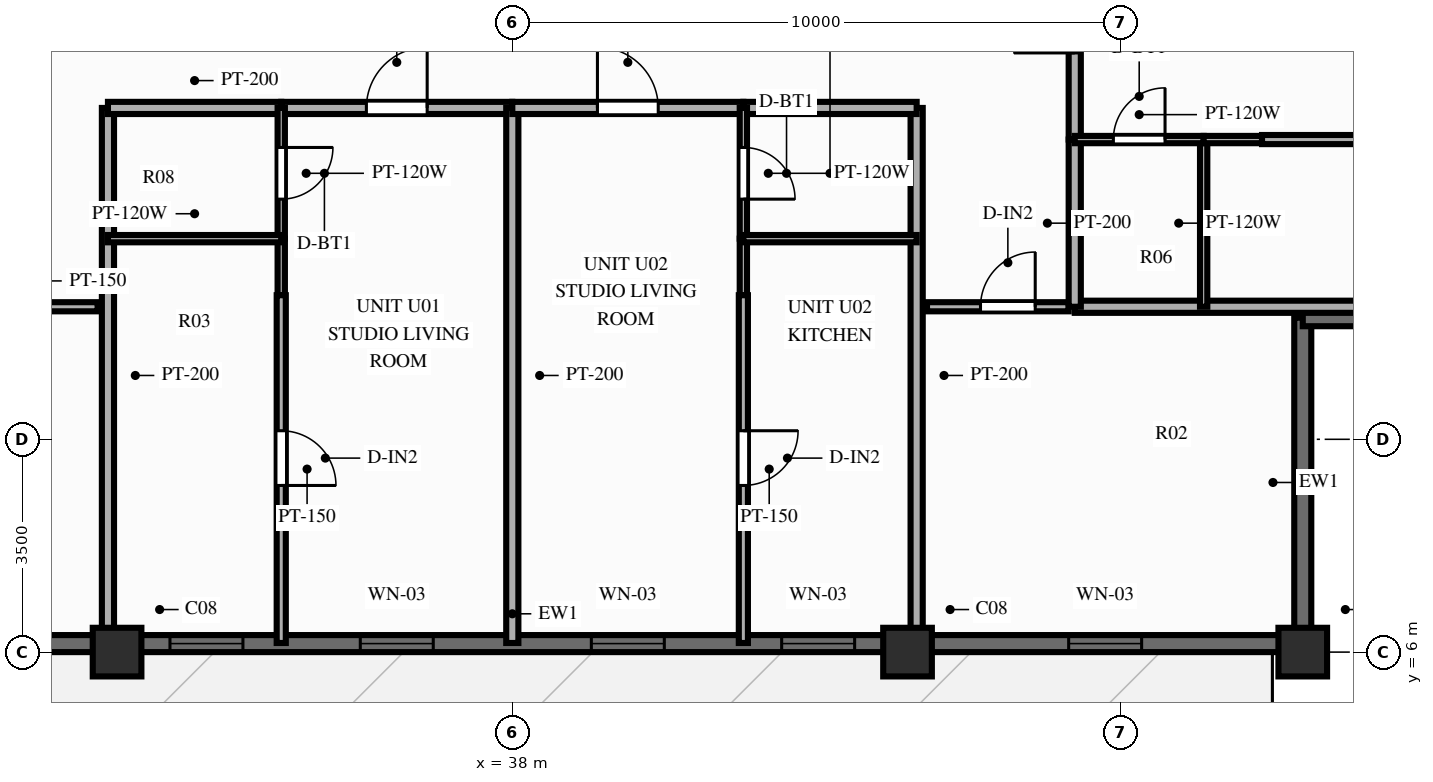
"""IFC4 building model, lengths in metres.
Left out: names, types, materials, properties, quantities, classifications, styles, units other than length and angle.
Written with IfcOpenShell. Run it as: python <this file> out.ifc"""

import sys

from ifc_helpers import new_model, si_unit, direction, frame, frame_2d, origin, origin_2d, place, context, subcontext, project, spatial, rectangle, extrude, source, transform, mapped, element, fill, save


model = new_model("IFC4")
c1 = context("Model", 3, precision=1e-05, world=origin(), true_north=direction((0.0, 1.0)))
c2 = subcontext(c1, "Body", "Model", "MODEL_VIEW")
j1 = project(units=[si_unit("LENGTHUNIT", "METRE"), si_unit("PLANEANGLEUNIT", "RADIAN")], contexts=[c1])
p1 = place(None, origin())
s1 = spatial("IfcSite", under=j1, at=p1, CompositionType="ELEMENT")
p2 = place(p1, origin())
s2 = spatial("IfcBuilding", under=s1, at=p2, CompositionType="ELEMENT")
p3 = place(p2, frame((0.0, 0.0, 199.6)))
s3 = spatial("IfcBuildingStorey", under=s2, at=p3, CompositionType="ELEMENT", Elevation=199.6)
m1 = source(origin(), c2, "Body", "SweptSolid", [
    extrude(rectangle(XDim=0.8, YDim=0.8, at=origin_2d()), origin(), (0.0, 0.0, 1.0), 3.0),
])
for number, where, z_axis, x_axis in (
    (1, (31.5, 6.0, 0.0), (0.0, 0.0, 1.0), (1.0, 0.0, 0.0)),
    (2, (44.5, 6.0, 0.0), (0.0, 0.0, 1.0), (1.0, 0.0, 0.0)),
    (3, (51.0, 6.0, 0.0), (0.0, 0.0, 1.0), (1.0, 0.0, 0.0)),
):
    element("IfcColumn", number, at=place(p3, frame(where, z_axis=z_axis, x_axis=x_axis)), inside=s3, PredefinedType="COLUMN", context=c2, shape_type="MappedRepresentation", body=[
        mapped(m1, transform((0.0, 0.0, 0.0), scale=1.0)),
    ])
p4 = place(p3, frame((25.0, 6.14, 0.0), z_axis=(0.0, 0.0, 1.0), x_axis=(1.0, 0.0, 0.0)))
e4 = element("IfcWall", 4, at=p4, inside=s3, PredefinedType="SOLIDWALL", context=c2, shape_type="SweptSolid", body=[
    extrude(rectangle(XDim=26.0, YDim=0.28, at=frame_2d((13.0, 0.0))), origin(), (0.0, 0.0, 1.0), 2.28),
])
p5 = place(p4, frame((3.8, 0.0, 0.0), z_axis=(0.0, 0.0, 1.0), x_axis=(-1.0, 0.0, 0.0)))
e5 = element("IfcOpeningElement", 5, at=p5, cuts=e4, PredefinedType="OPENING", context=c2, shape_type="SweptSolid", body=[
    extrude(rectangle(XDim=1.1, YDim=2.15, at=frame_2d((0.55, 1.075))), frame((0.0, 0.152, 0.0), z_axis=(0.0, -1.0, 0.0), x_axis=(1.0, 0.0, 0.0)), (0.0, 0.0, 1.0), 0.304),
])
p6 = place(p4, frame((7.37, 0.0, 0.25)))
e6 = element("IfcOpeningElement", 6, at=p6, cuts=e4, PredefinedType="OPENING", context=c2, shape_type="SweptSolid", body=[
    extrude(rectangle(XDim=1.2, YDim=1.5, at=frame_2d((0.6, 0.75))), frame((0.0, 0.152, 0.0), z_axis=(0.0, -1.0, 0.0), x_axis=(1.0, 0.0, 0.0)), (0.0, 0.0, 1.0), 0.304),
])
p7 = place(p4, frame((10.5, 0.0, 0.25)))
e7 = element("IfcOpeningElement", 7, at=p7, cuts=e4, PredefinedType="OPENING", context=c2, shape_type="SweptSolid", body=[
    extrude(rectangle(XDim=1.2, YDim=1.5, at=frame_2d((0.6, 0.75))), frame((0.0, 0.152, 0.0), z_axis=(0.0, -1.0, 0.0), x_axis=(1.0, 0.0, 0.0)), (0.0, 0.0, 1.0), 0.304),
])
p8 = place(p4, frame((14.3, 0.0, 0.25)))
e8 = element("IfcOpeningElement", 8, at=p8, cuts=e4, PredefinedType="OPENING", context=c2, shape_type="SweptSolid", body=[
    extrude(rectangle(XDim=1.2, YDim=1.5, at=frame_2d((0.6, 0.75))), frame((0.0, 0.152, 0.0), z_axis=(0.0, -1.0, 0.0), x_axis=(1.0, 0.0, 0.0)), (0.0, 0.0, 1.0), 0.304),
])
p9 = place(p4, frame((17.43, 0.0, 0.25)))
e9 = element("IfcOpeningElement", 9, at=p9, cuts=e4, PredefinedType="OPENING", context=c2, shape_type="SweptSolid", body=[
    extrude(rectangle(XDim=1.2, YDim=1.5, at=frame_2d((0.6, 0.75))), frame((0.0, 0.152, 0.0), z_axis=(0.0, -1.0, 0.0), x_axis=(1.0, 0.0, 0.0)), (0.0, 0.0, 1.0), 0.304),
])
p10 = place(p4, frame((22.15, 0.0, 0.25)))
e10 = element("IfcOpeningElement", 10, at=p10, cuts=e4, PredefinedType="OPENING", context=c2, shape_type="SweptSolid", body=[
    extrude(rectangle(XDim=1.2, YDim=1.5, at=frame_2d((0.6, 0.75))), frame((0.0, 0.152, 0.0), z_axis=(0.0, -1.0, 0.0), x_axis=(1.0, 0.0, 0.0)), (0.0, 0.0, 1.0), 0.304),
])
for number, where, z_axis, x_axis in (
    (11, (51.0, 6.08, 0.0), (0.0, 0.0, 1.0), (0.0, 1.0, 0.0)),
    (12, (51.0, 11.5, 0.0), (0.0, 0.0, 1.0), (1.0, 0.0, 0.0)),
):
    element("IfcWall", number, at=place(p3, frame(where, z_axis=z_axis, x_axis=x_axis)), inside=s3, PredefinedType="SOLIDWALL", context=c2, shape_type="SweptSolid", body=[
        extrude(rectangle(XDim=5.42, YDim=0.28, at=frame_2d((2.71, 0.0))), origin(), (0.0, 0.0, 1.0), 2.28),
    ])
p11 = place(p3, frame((28.85, 11.68, 0.0), z_axis=(0.0, 0.0, 1.0), x_axis=(1.0, 0.0, 0.0)))
e13 = element("IfcWall", 13, at=p11, inside=s3, PredefinedType="PARTITIONING", context=c2, shape_type="SweptSolid", body=[
    extrude(rectangle(XDim=2.33, YDim=0.15, at=frame_2d((1.165, 0.0))), origin(), (0.0, 0.0, 1.0), 2.79),
])
p12 = place(p11, frame((0.55, 0.0, 0.0)))
e14 = element("IfcOpeningElement", 14, at=p12, cuts=e13, PredefinedType="OPENING", context=c2, shape_type="SweptSolid", body=[
    extrude(rectangle(XDim=0.9, YDim=2.1, at=frame_2d((0.45, 1.05))), frame((0.0, 0.087, 0.0), z_axis=(0.0, -1.0, 0.0), x_axis=(1.0, 0.0, 0.0)), (0.0, 0.0, 1.0), 0.174),
])
p13 = place(p3, frame((44.82, 11.68, 0.0), z_axis=(0.0, 0.0, 1.0), x_axis=(1.0, 0.0, 0.0)))
e15 = element("IfcWall", 15, at=p13, inside=s3, PredefinedType="PARTITIONING", context=c2, shape_type="SweptSolid", body=[
    extrude(rectangle(XDim=2.33, YDim=0.15, at=frame_2d((1.165, 0.0))), origin(), (0.0, 0.0, 1.0), 2.79),
])
p14 = place(p13, frame((0.88, 0.0, 0.0)))
e16 = element("IfcOpeningElement", 16, at=p14, cuts=e15, PredefinedType="OPENING", context=c2, shape_type="SweptSolid", body=[
    extrude(rectangle(XDim=0.9, YDim=2.1, at=frame_2d((0.45, 1.05))), frame((0.0, 0.087, 0.0), z_axis=(0.0, -1.0, 0.0), x_axis=(1.0, 0.0, 0.0)), (0.0, 0.0, 1.0), 0.174),
])
for number, where, z_axis, x_axis in (
    (17, (31.35, 14.95, 0.0), (0.0, 0.0, 1.0), (0.0, -1.0, 0.0)),
    (18, (44.65, 14.95, 0.0), (0.0, 0.0, 1.0), (0.0, -1.0, 0.0)),
):
    element("IfcWall", number, at=place(p3, frame(where, z_axis=z_axis, x_axis=x_axis)), inside=s3, PredefinedType="PARTITIONING", context=c2, shape_type="SweptSolid", body=[
        extrude(rectangle(XDim=8.8, YDim=0.2, at=frame_2d((4.4, 0.0))), origin(), (0.0, 0.0, 1.0), 2.39),
    ])
p15 = place(p3, frame((31.35, 14.95, 0.0), z_axis=(0.0, 0.0, 1.0), x_axis=(1.0, 0.0, 0.0)))
e19 = element("IfcWall", 19, at=p15, inside=s3, PredefinedType="PARTITIONING", context=c2, shape_type="SweptSolid", body=[
    extrude(rectangle(XDim=2.85, YDim=0.2, at=frame_2d((1.425, 0.0))), origin(), (0.0, 0.0, 1.0), 2.79),
])
p16 = place(p3, frame((34.2, 14.95, 0.0), z_axis=(0.0, 0.0, 1.0), x_axis=(1.0, 0.0, 0.0)))
e20 = element("IfcWall", 20, at=p16, inside=s3, PredefinedType="PARTITIONING", context=c2, shape_type="SweptSolid", body=[
    extrude(rectangle(XDim=3.8, YDim=0.2, at=frame_2d((1.9, 0.0))), origin(), (0.0, 0.0, 1.0), 2.79),
])
p17 = place(p16, frame((1.4, 0.0, 0.0)))
e21 = element("IfcOpeningElement", 21, at=p17, cuts=e20, PredefinedType="OPENING", context=c2, shape_type="SweptSolid", body=[
    extrude(rectangle(XDim=1.0, YDim=2.15, at=frame_2d((0.5, 1.075))), frame((0.0, 0.112, 0.0), z_axis=(0.0, -1.0, 0.0), x_axis=(1.0, 0.0, 0.0)), (0.0, 0.0, 1.0), 0.224),
])
p18 = place(p3, frame((34.2, 14.95, 0.0), z_axis=(0.0, 0.0, 1.0), x_axis=(0.0, -1.0, 0.0)))
e22 = element("IfcWall", 22, at=p18, inside=s3, PredefinedType="PARTITIONING", context=c2, shape_type="SweptSolid", body=[
    extrude(rectangle(XDim=2.15, YDim=0.12, at=frame_2d((1.075, 0.0))), origin(), (0.0, 0.0, 1.0), 2.79),
])
p19 = place(p18, frame((0.65, 0.0, 0.0)))
e23 = element("IfcOpeningElement", 23, at=p19, cuts=e22, PredefinedType="OPENING", context=c2, shape_type="SweptSolid", body=[
    extrude(rectangle(XDim=0.85, YDim=2.05, at=frame_2d((0.425, 1.025))), frame((0.0, 0.072, 0.0), z_axis=(0.0, -1.0, 0.0), x_axis=(1.0, 0.0, 0.0)), (0.0, 0.0, 1.0), 0.144),
])
p20 = place(p3, frame((34.2, 12.8, 0.0), z_axis=(0.0, 0.0, 1.0), x_axis=(0.0, -1.0, 0.0)))
e24 = element("IfcWall", 24, at=p20, inside=s3, PredefinedType="PARTITIONING", context=c2, shape_type="SweptSolid", body=[
    extrude(rectangle(XDim=0.93, YDim=0.12, at=frame_2d((0.465, 0.0))), origin(), (0.0, 0.0, 1.0), 2.79),
])
p21 = place(p3, frame((31.35, 12.8, 0.0), z_axis=(0.0, 0.0, 1.0), x_axis=(1.0, 0.0, 0.0)))
e25 = element("IfcWall", 25, at=p21, inside=s3, PredefinedType="PARTITIONING", context=c2, shape_type="SweptSolid", body=[
    extrude(rectangle(XDim=2.85, YDim=0.12, at=frame_2d((1.425, 0.0))), origin(), (0.0, 0.0, 1.0), 2.79),
])
p22 = place(p3, frame((34.2, 11.87, 0.0), z_axis=(0.0, 0.0, 1.0), x_axis=(0.0, -1.0, 0.0)))
e26 = element("IfcWall", 26, at=p22, inside=s3, PredefinedType="PARTITIONING", context=c2, shape_type="SweptSolid", body=[
    extrude(rectangle(XDim=5.72, YDim=0.15, at=frame_2d((2.86, 0.0))), origin(), (0.0, 0.0, 1.0), 2.79),
])
p23 = place(p22, frame((2.229, 0.0, 0.0)))
e27 = element("IfcOpeningElement", 27, at=p23, cuts=e26, PredefinedType="OPENING", context=c2, shape_type="SweptSolid", body=[
    extrude(rectangle(XDim=0.9, YDim=2.1, at=frame_2d((0.45, 1.05))), frame((0.0, 0.087, 0.0), z_axis=(0.0, -1.0, 0.0), x_axis=(1.0, 0.0, 0.0)), (0.0, 0.0, 1.0), 0.174),
])
p24 = place(p3, frame((38.0, 14.95, 0.0), z_axis=(0.0, 0.0, 1.0), x_axis=(0.0, -1.0, 0.0)))
e28 = element("IfcWall", 28, at=p24, inside=s3, PredefinedType="PARTITIONING", context=c2, shape_type="SweptSolid", body=[
    extrude(rectangle(XDim=8.8, YDim=0.2, at=frame_2d((4.4, 0.0))), origin(), (0.0, 0.0, 1.0), 2.79),
])
p25 = place(p3, frame((38.0, 14.95, 0.0), z_axis=(0.0, 0.0, 1.0), x_axis=(1.0, 0.0, 0.0)))
e29 = element("IfcWall", 29, at=p25, inside=s3, PredefinedType="PARTITIONING", context=c2, shape_type="SweptSolid", body=[
    extrude(rectangle(XDim=3.8, YDim=0.2, at=frame_2d((1.9, 0.0))), origin(), (0.0, 0.0, 1.0), 2.79),
])
p26 = place(p25, frame((1.4, 0.0, 0.0)))
e30 = element("IfcOpeningElement", 30, at=p26, cuts=e29, PredefinedType="OPENING", context=c2, shape_type="SweptSolid", body=[
    extrude(rectangle(XDim=1.0, YDim=2.15, at=frame_2d((0.5, 1.075))), frame((0.0, 0.112, 0.0), z_axis=(0.0, -1.0, 0.0), x_axis=(1.0, 0.0, 0.0)), (0.0, 0.0, 1.0), 0.224),
])
p27 = place(p3, frame((41.8, 14.95, 0.0), z_axis=(0.0, 0.0, 1.0), x_axis=(1.0, 0.0, 0.0)))
e31 = element("IfcWall", 31, at=p27, inside=s3, PredefinedType="PARTITIONING", context=c2, shape_type="SweptSolid", body=[
    extrude(rectangle(XDim=2.85, YDim=0.2, at=frame_2d((1.425, 0.0))), origin(), (0.0, 0.0, 1.0), 2.79),
])
p28 = place(p3, frame((41.8, 14.95, 0.0), z_axis=(0.0, 0.0, 1.0), x_axis=(0.0, -1.0, 0.0)))
e32 = element("IfcWall", 32, at=p28, inside=s3, PredefinedType="PARTITIONING", context=c2, shape_type="SweptSolid", body=[
    extrude(rectangle(XDim=2.15, YDim=0.12, at=frame_2d((1.075, 0.0))), origin(), (0.0, 0.0, 1.0), 2.79),
])
p29 = place(p28, frame((0.65, 0.0, 0.0)))
e33 = element("IfcOpeningElement", 33, at=p29, cuts=e32, PredefinedType="OPENING", context=c2, shape_type="SweptSolid", body=[
    extrude(rectangle(XDim=0.85, YDim=2.05, at=frame_2d((0.425, 1.025))), frame((0.0, 0.072, 0.0), z_axis=(0.0, -1.0, 0.0), x_axis=(1.0, 0.0, 0.0)), (0.0, 0.0, 1.0), 0.144),
])
p30 = place(p3, frame((41.8, 12.8, 0.0), z_axis=(0.0, 0.0, 1.0), x_axis=(0.0, -1.0, 0.0)))
e34 = element("IfcWall", 34, at=p30, inside=s3, PredefinedType="PARTITIONING", context=c2, shape_type="SweptSolid", body=[
    extrude(rectangle(XDim=0.93, YDim=0.12, at=frame_2d((0.465, 0.0))), origin(), (0.0, 0.0, 1.0), 2.79),
])
p31 = place(p3, frame((41.8, 12.8, 0.0), z_axis=(0.0, 0.0, 1.0), x_axis=(1.0, 0.0, 0.0)))
e35 = element("IfcWall", 35, at=p31, inside=s3, PredefinedType="PARTITIONING", context=c2, shape_type="SweptSolid", body=[
    extrude(rectangle(XDim=2.85, YDim=0.12, at=frame_2d((1.425, 0.0))), origin(), (0.0, 0.0, 1.0), 2.79),
])
p32 = place(p3, frame((41.8, 11.87, 0.0), z_axis=(0.0, 0.0, 1.0), x_axis=(0.0, -1.0, 0.0)))
e36 = element("IfcWall", 36, at=p32, inside=s3, PredefinedType="PARTITIONING", context=c2, shape_type="SweptSolid", body=[
    extrude(rectangle(XDim=5.72, YDim=0.15, at=frame_2d((2.86, 0.0))), origin(), (0.0, 0.0, 1.0), 2.79),
])
p33 = place(p32, frame((2.229, 0.0, 0.0)))
e37 = element("IfcOpeningElement", 37, at=p33, cuts=e36, PredefinedType="OPENING", context=c2, shape_type="SweptSolid", body=[
    extrude(rectangle(XDim=0.9, YDim=2.1, at=frame_2d((0.45, 1.05))), frame((0.0, 0.087, 0.0), z_axis=(0.0, -1.0, 0.0), x_axis=(1.0, 0.0, 0.0)), (0.0, 0.0, 1.0), 0.174),
])
p34 = place(p3, frame((47.25, 11.68, 0.0), z_axis=(0.0, 0.0, 1.0), x_axis=(1.0, 0.0, 0.0)))
e38 = element("IfcWall", 38, at=p34, inside=s3, PredefinedType="PARTITIONING", context=c2, shape_type="SweptSolid", body=[
    extrude(rectangle(XDim=9.1, YDim=0.2, at=frame_2d((4.55, 0.0))), origin(), (0.0, 0.0, 1.0), 2.79),
])
p35 = place(p3, frame((47.25, 11.68, 0.0), z_axis=(0.0, 0.0, 1.0), x_axis=(0.0, 1.0, 0.0)))
e39 = element("IfcWall", 39, at=p35, inside=s3, PredefinedType="PARTITIONING", context=c2, shape_type="SweptSolid", body=[
    extrude(rectangle(XDim=2.75, YDim=0.2, at=frame_2d((1.375, 0.0))), origin(), (0.0, 0.0, 1.0), 2.79),
])
p36 = place(p3, frame((47.25, 14.43, 0.0), z_axis=(0.0, 0.0, 1.0), x_axis=(0.0, 1.0, 0.0)))
e40 = element("IfcWall", 40, at=p36, inside=s3, PredefinedType="PARTITIONING", context=c2, shape_type="SweptSolid", body=[
    extrude(rectangle(XDim=3.85, YDim=0.2, at=frame_2d((1.925, 0.0))), origin(), (0.0, 0.0, 1.0), 2.79),
])
p37 = place(p36, frame((1.425, 0.0, 0.0)))
e41 = element("IfcOpeningElement", 41, at=p37, cuts=e40, PredefinedType="OPENING", context=c2, shape_type="SweptSolid", body=[
    extrude(rectangle(XDim=1.0, YDim=2.15, at=frame_2d((0.5, 1.075))), frame((0.0, 0.112, 0.0), z_axis=(0.0, -1.0, 0.0), x_axis=(1.0, 0.0, 0.0)), (0.0, 0.0, 1.0), 0.224),
])
p38 = place(p3, frame((49.37, 11.68, 0.0), z_axis=(0.0, 0.0, 1.0), x_axis=(0.0, 1.0, 0.0)))
e42 = element("IfcWall", 42, at=p38, inside=s3, PredefinedType="PARTITIONING", context=c2, shape_type="SweptSolid", body=[
    extrude(rectangle(XDim=2.75, YDim=0.12, at=frame_2d((1.375, 0.0))), origin(), (0.0, 0.0, 1.0), 2.79),
])
p39 = place(p3, frame((47.25, 14.43, 0.0), z_axis=(0.0, 0.0, 1.0), x_axis=(1.0, 0.0, 0.0)))
e43 = element("IfcWall", 43, at=p39, inside=s3, PredefinedType="PARTITIONING", context=c2, shape_type="SweptSolid", body=[
    extrude(rectangle(XDim=2.12, YDim=0.12, at=frame_2d((1.06, 0.0))), origin(), (0.0, 0.0, 1.0), 2.79),
])
p40 = place(p39, frame((0.635, 0.0, 0.0)))
e44 = element("IfcOpeningElement", 44, at=p40, cuts=e43, PredefinedType="OPENING", context=c2, shape_type="SweptSolid", body=[
    extrude(rectangle(XDim=0.85, YDim=2.05, at=frame_2d((0.425, 1.025))), frame((0.0, 0.072, 0.0), z_axis=(0.0, -1.0, 0.0), x_axis=(1.0, 0.0, 0.0)), (0.0, 0.0, 1.0), 0.144),
])
p41 = place(p3, frame((49.37, 14.43, 0.0), z_axis=(0.0, 0.0, 1.0), x_axis=(1.0, 0.0, 0.0)))
e45 = element("IfcWall", 45, at=p41, inside=s3, PredefinedType="PARTITIONING", context=c2, shape_type="SweptSolid", body=[
    extrude(rectangle(XDim=0.96, YDim=0.12, at=frame_2d((0.48, 0.0))), origin(), (0.0, 0.0, 1.0), 2.79),
])
p42 = place(p3, frame((50.33, 14.43, 0.0), z_axis=(0.0, 0.0, 1.0), x_axis=(1.0, 0.0, 0.0)))
e46 = element("IfcWall", 46, at=p42, inside=s3, PredefinedType="PARTITIONING", context=c2, shape_type="SweptSolid", body=[
    extrude(rectangle(XDim=6.02, YDim=0.15, at=frame_2d((3.01, 0.0))), origin(), (0.0, 0.0, 1.0), 2.79),
])
p43 = place(p42, frame((2.367, 0.0, 0.0)))
e47 = element("IfcOpeningElement", 47, at=p43, cuts=e46, PredefinedType="OPENING", context=c2, shape_type="SweptSolid", body=[
    extrude(rectangle(XDim=0.9, YDim=2.1, at=frame_2d((0.45, 1.05))), frame((0.0, 0.087, 0.0), z_axis=(0.0, -1.0, 0.0), x_axis=(1.0, 0.0, 0.0)), (0.0, 0.0, 1.0), 0.174),
])
m2 = source(origin(), c2, "Body", "SweptSolid", [
    extrude(rectangle(XDim=1.2, YDim=1.5, at=frame_2d((0.6, 0.75))), frame((0.0, 0.03, 0.0), z_axis=(0.0, -1.0, 0.0), x_axis=(1.0, 0.0, 0.0)), (0.0, 0.0, 1.0), 0.06),
])
p44 = place(p6, origin())
e48 = element("IfcWindow", 48, at=p44, inside=s3, PartitioningType="SINGLE_PANEL", PredefinedType="WINDOW", context=c2, shape_type="MappedRepresentation", body=[
    mapped(m2, transform((0.0, 0.0, 0.0), scale=1.0)),
])
fill(e6, e48)
p45 = place(p7, origin())
e49 = element("IfcWindow", 49, at=p45, inside=s3, PartitioningType="SINGLE_PANEL", PredefinedType="WINDOW", context=c2, shape_type="MappedRepresentation", body=[
    mapped(m2, transform((0.0, 0.0, 0.0), scale=1.0)),
])
fill(e7, e49)
p46 = place(p8, origin())
e50 = element("IfcWindow", 50, at=p46, inside=s3, PartitioningType="SINGLE_PANEL", PredefinedType="WINDOW", context=c2, shape_type="MappedRepresentation", body=[
    mapped(m2, transform((0.0, 0.0, 0.0), scale=1.0)),
])
fill(e8, e50)
p47 = place(p9, origin())
e51 = element("IfcWindow", 51, at=p47, inside=s3, PartitioningType="SINGLE_PANEL", PredefinedType="WINDOW", context=c2, shape_type="MappedRepresentation", body=[
    mapped(m2, transform((0.0, 0.0, 0.0), scale=1.0)),
])
fill(e9, e51)
p48 = place(p10, origin())
e52 = element("IfcWindow", 52, at=p48, inside=s3, PartitioningType="SINGLE_PANEL", PredefinedType="WINDOW", context=c2, shape_type="MappedRepresentation", body=[
    mapped(m2, transform((0.0, 0.0, 0.0), scale=1.0)),
])
fill(e10, e52)
m3 = source(origin(), c2, "Body", "SweptSolid", [
    extrude(rectangle(XDim=0.9, YDim=2.1, at=frame_2d((0.45, 1.05))), frame((0.0, 0.025, 0.0), z_axis=(0.0, -1.0, 0.0), x_axis=(1.0, 0.0, 0.0)), (0.0, 0.0, 1.0), 0.05),
])
p49 = place(p14, origin())
e53 = element("IfcDoor", 53, at=p49, inside=s3, OperationType="SINGLE_SWING_RIGHT", PredefinedType="DOOR", context=c2, shape_type="MappedRepresentation", body=[
    mapped(m3, transform((0.0, 0.0, 0.0), scale=1.0)),
])
fill(e16, e53)
m4 = source(origin(), c2, "Body", "SweptSolid", [
    extrude(rectangle(XDim=1.0, YDim=2.15, at=frame_2d((0.5, 1.075))), frame((0.0, 0.025, 0.0), z_axis=(0.0, -1.0, 0.0), x_axis=(1.0, 0.0, 0.0)), (0.0, 0.0, 1.0), 0.05),
])
p50 = place(p17, origin())
e54 = element("IfcDoor", 54, at=p50, inside=s3, OperationType="SINGLE_SWING_RIGHT", PredefinedType="DOOR", context=c2, shape_type="MappedRepresentation", body=[
    mapped(m4, transform((0.0, 0.0, 0.0), scale=1.0)),
])
fill(e21, e54)
m5 = source(origin(), c2, "Body", "SweptSolid", [
    extrude(rectangle(XDim=0.85, YDim=2.05, at=frame_2d((0.425, 1.025))), frame((0.0, 0.025, 0.0), z_axis=(0.0, -1.0, 0.0), x_axis=(1.0, 0.0, 0.0)), (0.0, 0.0, 1.0), 0.05),
])
p51 = place(p19, origin())
e55 = element("IfcDoor", 55, at=p51, inside=s3, OperationType="SINGLE_SWING_LEFT", PredefinedType="DOOR", context=c2, shape_type="MappedRepresentation", body=[
    mapped(m5, transform((0.0, 0.0, 0.0), scale=1.0)),
])
fill(e23, e55)
p52 = place(p23, origin())
e56 = element("IfcDoor", 56, at=p52, inside=s3, OperationType="SINGLE_SWING_RIGHT", PredefinedType="DOOR", context=c2, shape_type="MappedRepresentation", body=[
    mapped(m3, transform((0.0, 0.0, 0.0), scale=1.0)),
])
fill(e27, e56)
p53 = place(p26, origin())
e57 = element("IfcDoor", 57, at=p53, inside=s3, OperationType="SINGLE_SWING_LEFT", PredefinedType="DOOR", context=c2, shape_type="MappedRepresentation", body=[
    mapped(m4, transform((0.0, 0.0, 0.0), scale=1.0)),
])
fill(e30, e57)
p54 = place(p29, origin())
e58 = element("IfcDoor", 58, at=p54, inside=s3, OperationType="SINGLE_SWING_RIGHT", PredefinedType="DOOR", context=c2, shape_type="MappedRepresentation", body=[
    mapped(m5, transform((0.0, 0.0, 0.0), scale=1.0)),
])
fill(e33, e58)
p55 = place(p33, origin())
e59 = element("IfcDoor", 59, at=p55, inside=s3, OperationType="SINGLE_SWING_LEFT", PredefinedType="DOOR", context=c2, shape_type="MappedRepresentation", body=[
    mapped(m3, transform((0.0, 0.0, 0.0), scale=1.0)),
])
fill(e37, e59)
p56 = place(p37, origin())
e60 = element("IfcDoor", 60, at=p56, inside=s3, OperationType="SINGLE_SWING_LEFT", PredefinedType="DOOR", context=c2, shape_type="MappedRepresentation", body=[
    mapped(m4, transform((0.0, 0.0, 0.0), scale=1.0)),
])
fill(e41, e60)
p57 = place(p40, origin())
e61 = element("IfcDoor", 61, at=p57, inside=s3, OperationType="SINGLE_SWING_RIGHT", PredefinedType="DOOR", context=c2, shape_type="MappedRepresentation", body=[
    mapped(m5, transform((0.0, 0.0, 0.0), scale=1.0)),
])
fill(e44, e61)
save(model, sys.argv[1])
